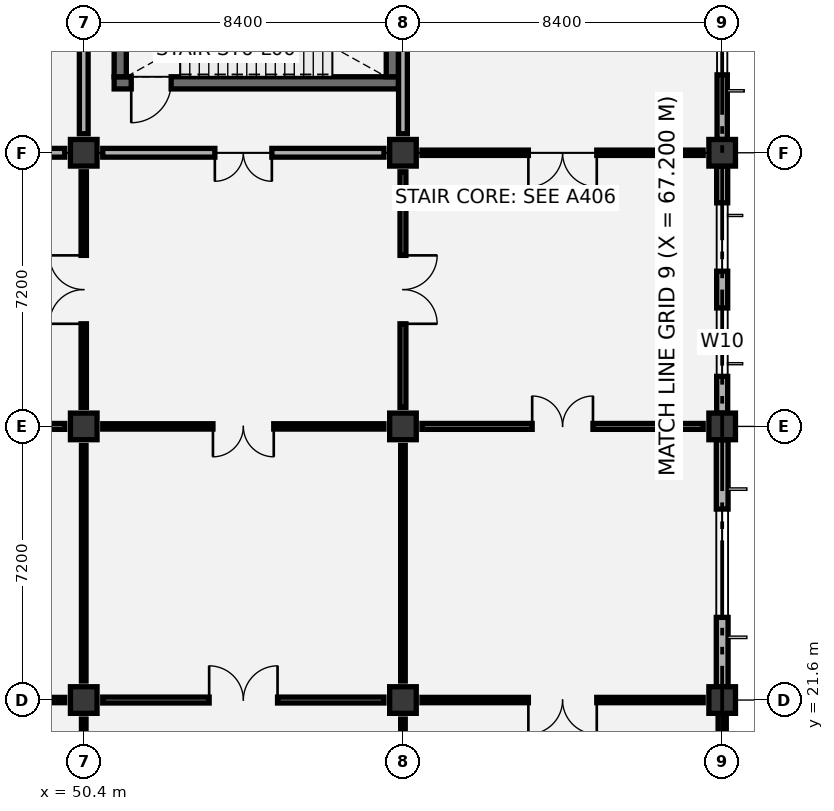
"""IFC4 building model, lengths in metres.
Left out: names, types, materials, properties, quantities, classifications, styles, units other than length and angle.
Written with IfcOpenShell. Run it as: python <this file> out.ifc"""

import sys

from ifc_helpers import new_model, si_unit, direction, frame, frame_2d, origin, origin_2d, place, context, subcontext, project, spatial, rectangle, extrude, element, fill, save


model = new_model("IFC4")
c1 = context("Model", 3, precision=1e-05, world=origin(), true_north=direction((0.0, 1.0)))
c2 = subcontext(c1, "Body", "Model", "MODEL_VIEW")
j1 = project(units=[si_unit("LENGTHUNIT", "METRE"), si_unit("PLANEANGLEUNIT", "RADIAN")], contexts=[c1])
p1 = place(None, origin())
s1 = spatial("IfcSite", under=j1, at=p1, CompositionType="ELEMENT")
p2 = place(p1, origin())
s2 = spatial("IfcBuilding", under=s1, at=p2, CompositionType="ELEMENT")
p3 = place(p2, origin())
s3 = spatial("IfcBuildingStorey", under=s2, at=p3, CompositionType="ELEMENT", Elevation=0.0)
for number, where, z_axis, x_axis in (
    (1, (50.4, 21.6, 0.0), (0.0, 0.0, 1.0), (1.0, 0.0, 0.0)),
    (2, (50.4, 28.8, 0.0), (0.0, 0.0, 1.0), (1.0, 0.0, 0.0)),
    (3, (50.4, 36.0, 0.0), (0.0, 0.0, 1.0), (1.0, 0.0, 0.0)),
    (4, (58.8, 21.6, 0.0), (0.0, 0.0, 1.0), (1.0, 0.0, 0.0)),
    (5, (58.8, 28.8, 0.0), (0.0, 0.0, 1.0), (1.0, 0.0, 0.0)),
    (6, (58.8, 36.0, 0.0), (0.0, 0.0, 1.0), (1.0, 0.0, 0.0)),
    (7, (67.2, 21.6, 0.0), (0.0, 0.0, 1.0), (1.0, 0.0, 0.0)),
    (8, (67.2, 28.8, 0.0), (0.0, 0.0, 1.0), (1.0, 0.0, 0.0)),
    (9, (67.2, 36.0, 0.0), (0.0, 0.0, 1.0), (1.0, 0.0, 0.0)),
):
    element("IfcColumn", number, at=place(p3, frame(where, z_axis=z_axis, x_axis=x_axis)), inside=s3, PredefinedType="COLUMN", context=c2, shape_type="SweptSolid", body=[
        extrude(rectangle(XDim=0.7, YDim=0.7, at=origin_2d()), origin(), (0.0, 0.0, 1.0), 6.0),
    ])
p4 = place(p3, frame((51.2, 37.84, 0.0), z_axis=(0.0, 0.0, 1.0), x_axis=(1.0, 0.0, 0.0)))
e10 = element("IfcWall", 10, at=p4, inside=s3, PredefinedType="SHEAR", context=c2, shape_type="SweptSolid", body=[
    extrude(rectangle(XDim=7.48, YDim=0.32, at=frame_2d((3.74, 0.0))), origin(), (0.0, 0.0, 1.0), 5.675),
])
p5 = place(p4, frame((0.45, 0.0, 0.0)))
e11 = element("IfcOpeningElement", 11, at=p5, cuts=e10, PredefinedType="OPENING", context=c2, shape_type="SweptSolid", body=[
    extrude(rectangle(XDim=1.05, YDim=2.15, at=frame_2d((0.525, 1.075))), frame((0.0, 0.17, 0.0), z_axis=(0.0, -1.0, 0.0), x_axis=(1.0, 0.0, 0.0)), (0.0, 0.0, 1.0), 0.34),
])
for number, where, z_axis, x_axis in (
    (12, (51.36, 38.0, 0.0), (0.0, 0.0, 1.0), (0.0, 1.0, 0.0)),
    (13, (58.52, 38.0, 0.0), (0.0, 0.0, 1.0), (0.0, 1.0, 0.0)),
):
    element("IfcWall", number, at=place(p3, frame(where, z_axis=z_axis, x_axis=x_axis)), inside=s3, PredefinedType="SHEAR", context=c2, shape_type="SweptSolid", body=[
        extrude(rectangle(XDim=3.8, YDim=0.32, at=frame_2d((1.9, 0.0))), origin(), (0.0, 0.0, 1.0), 5.675),
    ])
p6 = place(p3, frame((67.2, 14.75, 0.0), z_axis=(0.0, 0.0, 1.0), x_axis=(0.0, 1.0, 0.0)))
e14 = element("IfcWall", 14, at=p6, inside=s3, PredefinedType="SOLIDWALL", context=c2, shape_type="SweptSolid", body=[
    extrude(rectangle(XDim=6.5, YDim=0.215, at=frame_2d((3.25, 0.0))), origin(), (0.0, 0.0, 1.0), 5.02),
])
p7 = place(p6, frame((1.9, 0.0, 0.9)))
e15 = element("IfcOpeningElement", 15, at=p7, cuts=e14, PredefinedType="OPENING", context=c2, shape_type="SweptSolid", body=[
    extrude(rectangle(XDim=2.7, YDim=2.1, at=frame_2d((1.35, 1.05))), frame((0.0, 0.117, 0.0), z_axis=(0.0, -1.0, 0.0), x_axis=(1.0, 0.0, 0.0)), (0.0, 0.0, 1.0), 0.235),
])
p8 = place(p3, frame((67.2, 21.95, 0.0), z_axis=(0.0, 0.0, 1.0), x_axis=(0.0, 1.0, 0.0)))
e16 = element("IfcWall", 16, at=p8, inside=s3, PredefinedType="SOLIDWALL", context=c2, shape_type="SweptSolid", body=[
    extrude(rectangle(XDim=6.5, YDim=0.31, at=frame_2d((3.25, 0.0))), origin(), (0.0, 0.0, 1.0), 5.02),
])
p9 = place(p8, frame((1.825, 0.0, 0.9)))
e17 = element("IfcOpeningElement", 17, at=p9, cuts=e16, PredefinedType="OPENING", context=c2, shape_type="SweptSolid", body=[
    extrude(rectangle(XDim=2.85, YDim=1.95, at=frame_2d((1.425, 0.975))), frame((0.0, 0.165, 0.0), z_axis=(0.0, -1.0, 0.0), x_axis=(1.0, 0.0, 0.0)), (0.0, 0.0, 1.0), 0.33),
])
p10 = place(p3, frame((67.2, 29.15, 0.0), z_axis=(0.0, 0.0, 1.0), x_axis=(0.0, 1.0, 0.0)))
e18 = element("IfcWall", 18, at=p10, inside=s3, PredefinedType="SOLIDWALL", context=c2, shape_type="SweptSolid", body=[
    extrude(rectangle(XDim=6.5, YDim=0.29, at=frame_2d((3.25, 0.0))), origin(), (0.0, 0.0, 1.0), 5.02),
])
p11 = place(p10, frame((0.967, 0.0, 0.9)))
e19 = element("IfcOpeningElement", 19, at=p11, cuts=e18, PredefinedType="OPENING", context=c2, shape_type="SweptSolid", body=[
    extrude(rectangle(XDim=1.8, YDim=2.1, at=frame_2d((0.9, 1.05))), frame((0.0, 0.155, 0.0), z_axis=(0.0, -1.0, 0.0), x_axis=(1.0, 0.0, 0.0)), (0.0, 0.0, 1.0), 0.31),
])
p12 = place(p10, frame((3.733, 0.0, 0.9)))
e20 = element("IfcOpeningElement", 20, at=p12, cuts=e18, PredefinedType="OPENING", context=c2, shape_type="SweptSolid", body=[
    extrude(rectangle(XDim=1.8, YDim=2.1, at=frame_2d((0.9, 1.05))), frame((0.0, 0.155, 0.0), z_axis=(0.0, -1.0, 0.0), x_axis=(1.0, 0.0, 0.0)), (0.0, 0.0, 1.0), 0.31),
])
p13 = place(p3, frame((67.2, 36.35, 0.0), z_axis=(0.0, 0.0, 1.0), x_axis=(0.0, 1.0, 0.0)))
e21 = element("IfcWall", 21, at=p13, inside=s3, PredefinedType="SOLIDWALL", context=c2, shape_type="SweptSolid", body=[
    extrude(rectangle(XDim=6.4, YDim=0.27, at=frame_2d((3.2, 0.0))), origin(), (0.0, 0.0, 1.0), 5.02),
])
p14 = place(p13, frame((1.7, 0.0, 0.9)))
e22 = element("IfcOpeningElement", 22, at=p14, cuts=e21, PredefinedType="OPENING", context=c2, shape_type="SweptSolid", body=[
    extrude(rectangle(XDim=3.0, YDim=2.1, at=frame_2d((1.5, 1.05))), frame((0.0, 0.145, 0.0), z_axis=(0.0, -1.0, 0.0), x_axis=(1.0, 0.0, 0.0)), (0.0, 0.0, 1.0), 0.29),
])
p15 = place(p3, frame((50.4, 14.9, 0.0), z_axis=(0.0, 0.0, 1.0), x_axis=(0.0, 1.0, 0.0)))
e23 = element("IfcWall", 23, at=p15, inside=s3, PredefinedType="PARTITIONING", context=c2, shape_type="SweptSolid", body=[
    extrude(rectangle(XDim=6.2, YDim=0.12, at=frame_2d((3.1, 0.0))), origin(), (0.0, 0.0, 1.0), 5.38),
])
p16 = place(p3, frame((42.5, 21.6, 0.0), z_axis=(0.0, 0.0, 1.0), x_axis=(1.0, 0.0, 0.0)))
e24 = element("IfcWall", 24, at=p16, inside=s3, PredefinedType="PARTITIONING", context=c2, shape_type="SweptSolid", body=[
    extrude(rectangle(XDim=7.4, YDim=0.14, at=frame_2d((3.7, 0.0))), origin(), (0.0, 0.0, 1.0), 4.87),
])
p17 = place(p16, frame((2.8, 0.0, 0.0)))
e25 = element("IfcOpeningElement", 25, at=p17, cuts=e24, PredefinedType="OPENING", context=c2, shape_type="SweptSolid", body=[
    extrude(rectangle(XDim=1.8, YDim=2.25, at=frame_2d((0.9, 1.125))), frame((0.0, 0.08, 0.0), z_axis=(0.0, -1.0, 0.0), x_axis=(1.0, 0.0, 0.0)), (0.0, 0.0, 1.0), 0.16),
])
p18 = place(p3, frame((50.4, 22.1, 0.0), z_axis=(0.0, 0.0, 1.0), x_axis=(0.0, 1.0, 0.0)))
e26 = element("IfcWall", 26, at=p18, inside=s3, PredefinedType="PARTITIONING", context=c2, shape_type="SweptSolid", body=[
    extrude(rectangle(XDim=6.2, YDim=0.12, at=frame_2d((3.1, 0.0))), origin(), (0.0, 0.0, 1.0), 4.92),
])
p19 = place(p3, frame((42.5, 28.8, 0.0), z_axis=(0.0, 0.0, 1.0), x_axis=(1.0, 0.0, 0.0)))
e27 = element("IfcWall", 27, at=p19, inside=s3, PredefinedType="PARTITIONING", context=c2, shape_type="SweptSolid", body=[
    extrude(rectangle(XDim=7.4, YDim=0.155, at=frame_2d((3.7, 0.0))), origin(), (0.0, 0.0, 1.0), 4.87),
])
p20 = place(p19, frame((2.9, 0.0, 0.0)))
e28 = element("IfcOpeningElement", 28, at=p20, cuts=e27, PredefinedType="OPENING", context=c2, shape_type="SweptSolid", body=[
    extrude(rectangle(XDim=1.6, YDim=2.2, at=frame_2d((0.8, 1.1))), frame((0.0, 0.087, 0.0), z_axis=(0.0, -1.0, 0.0), x_axis=(1.0, 0.0, 0.0)), (0.0, 0.0, 1.0), 0.175),
])
p21 = place(p3, frame((50.4, 29.3, 0.0), z_axis=(0.0, 0.0, 1.0), x_axis=(0.0, 1.0, 0.0)))
e29 = element("IfcWall", 29, at=p21, inside=s3, PredefinedType="PARTITIONING", context=c2, shape_type="SweptSolid", body=[
    extrude(rectangle(XDim=6.2, YDim=0.14, at=frame_2d((3.1, 0.0))), origin(), (0.0, 0.0, 1.0), 5.17),
])
p22 = place(p21, frame((2.2, 0.0, 0.0)))
e30 = element("IfcOpeningElement", 30, at=p22, cuts=e29, PredefinedType="OPENING", context=c2, shape_type="SweptSolid", body=[
    extrude(rectangle(XDim=1.8, YDim=2.25, at=frame_2d((0.9, 1.125))), frame((0.0, 0.08, 0.0), z_axis=(0.0, -1.0, 0.0), x_axis=(1.0, 0.0, 0.0)), (0.0, 0.0, 1.0), 0.16),
])
p23 = place(p3, frame((42.5, 36.0, 0.0), z_axis=(0.0, 0.0, 1.0), x_axis=(1.0, 0.0, 0.0)))
e31 = element("IfcWall", 31, at=p23, inside=s3, PredefinedType="PARTITIONING", context=c2, shape_type="SweptSolid", body=[
    extrude(rectangle(XDim=7.4, YDim=0.23, at=frame_2d((3.7, 0.0))), origin(), (0.0, 0.0, 1.0), 4.87),
])
p24 = place(p23, frame((2.95, 0.0, 0.0)))
e32 = element("IfcOpeningElement", 32, at=p24, cuts=e31, PredefinedType="OPENING", context=c2, shape_type="SweptSolid", body=[
    extrude(rectangle(XDim=1.5, YDim=2.15, at=frame_2d((0.75, 1.075))), frame((0.0, 0.125, 0.0), z_axis=(0.0, -1.0, 0.0), x_axis=(1.0, 0.0, 0.0)), (0.0, 0.0, 1.0), 0.25),
])
p25 = place(p3, frame((50.4, 36.5, 0.0), z_axis=(0.0, 0.0, 1.0), x_axis=(0.0, 1.0, 0.0)))
e33 = element("IfcWall", 33, at=p25, inside=s3, PredefinedType="PARTITIONING", context=c2, shape_type="SweptSolid", body=[
    extrude(rectangle(XDim=6.2, YDim=0.23, at=frame_2d((3.1, 0.0))), origin(), (0.0, 0.0, 1.0), 4.92),
])
p26 = place(p3, frame((58.8, 14.9, 0.0), z_axis=(0.0, 0.0, 1.0), x_axis=(0.0, 1.0, 0.0)))
e34 = element("IfcWall", 34, at=p26, inside=s3, PredefinedType="PARTITIONING", context=c2, shape_type="SweptSolid", body=[
    extrude(rectangle(XDim=6.2, YDim=0.12, at=frame_2d((3.1, 0.0))), origin(), (0.0, 0.0, 1.0), 4.92),
])
p27 = place(p3, frame((50.9, 21.6, 0.0), z_axis=(0.0, 0.0, 1.0), x_axis=(1.0, 0.0, 0.0)))
e35 = element("IfcWall", 35, at=p27, inside=s3, PredefinedType="PARTITIONING", context=c2, shape_type="SweptSolid", body=[
    extrude(rectangle(XDim=7.4, YDim=0.155, at=frame_2d((3.7, 0.0))), origin(), (0.0, 0.0, 1.0), 4.87),
])
p28 = place(p27, frame((2.8, 0.0, 0.0)))
e36 = element("IfcOpeningElement", 36, at=p28, cuts=e35, PredefinedType="OPENING", context=c2, shape_type="SweptSolid", body=[
    extrude(rectangle(XDim=1.8, YDim=2.25, at=frame_2d((0.9, 1.125))), frame((0.0, 0.087, 0.0), z_axis=(0.0, -1.0, 0.0), x_axis=(1.0, 0.0, 0.0)), (0.0, 0.0, 1.0), 0.175),
])
p29 = place(p3, frame((58.8, 22.1, 0.0), z_axis=(0.0, 0.0, 1.0), x_axis=(0.0, 1.0, 0.0)))
e37 = element("IfcWall", 37, at=p29, inside=s3, PredefinedType="PARTITIONING", context=c2, shape_type="SweptSolid", body=[
    extrude(rectangle(XDim=6.2, YDim=0.12, at=frame_2d((3.1, 0.0))), origin(), (0.0, 0.0, 1.0), 5.17),
])
p30 = place(p3, frame((50.9, 28.8, 0.0), z_axis=(0.0, 0.0, 1.0), x_axis=(1.0, 0.0, 0.0)))
e38 = element("IfcWall", 38, at=p30, inside=s3, PredefinedType="PARTITIONING", context=c2, shape_type="SweptSolid", body=[
    extrude(rectangle(XDim=7.4, YDim=0.14, at=frame_2d((3.7, 0.0))), origin(), (0.0, 0.0, 1.0), 4.87),
])
p31 = place(p30, frame((2.9, 0.0, 0.0)))
e39 = element("IfcOpeningElement", 39, at=p31, cuts=e38, PredefinedType="OPENING", context=c2, shape_type="SweptSolid", body=[
    extrude(rectangle(XDim=1.6, YDim=2.2, at=frame_2d((0.8, 1.1))), frame((0.0, 0.08, 0.0), z_axis=(0.0, -1.0, 0.0), x_axis=(1.0, 0.0, 0.0)), (0.0, 0.0, 1.0), 0.16),
])
p32 = place(p3, frame((58.8, 29.3, 0.0), z_axis=(0.0, 0.0, 1.0), x_axis=(0.0, 1.0, 0.0)))
e40 = element("IfcWall", 40, at=p32, inside=s3, PredefinedType="PARTITIONING", context=c2, shape_type="SweptSolid", body=[
    extrude(rectangle(XDim=6.2, YDim=0.155, at=frame_2d((3.1, 0.0))), origin(), (0.0, 0.0, 1.0), 4.92),
])
p33 = place(p32, frame((2.2, 0.0, 0.0)))
e41 = element("IfcOpeningElement", 41, at=p33, cuts=e40, PredefinedType="OPENING", context=c2, shape_type="SweptSolid", body=[
    extrude(rectangle(XDim=1.8, YDim=2.25, at=frame_2d((0.9, 1.125))), frame((0.0, 0.087, 0.0), z_axis=(0.0, -1.0, 0.0), x_axis=(1.0, 0.0, 0.0)), (0.0, 0.0, 1.0), 0.175),
])
p34 = place(p3, frame((50.9, 36.0, 0.0), z_axis=(0.0, 0.0, 1.0), x_axis=(1.0, 0.0, 0.0)))
e42 = element("IfcWall", 42, at=p34, inside=s3, PredefinedType="PARTITIONING", context=c2, shape_type="SweptSolid", body=[
    extrude(rectangle(XDim=7.4, YDim=0.23, at=frame_2d((3.7, 0.0))), origin(), (0.0, 0.0, 1.0), 4.87),
])
p35 = place(p34, frame((2.95, 0.0, 0.0)))
e43 = element("IfcOpeningElement", 43, at=p35, cuts=e42, PredefinedType="OPENING", context=c2, shape_type="SweptSolid", body=[
    extrude(rectangle(XDim=1.5, YDim=2.15, at=frame_2d((0.75, 1.075))), frame((0.0, 0.125, 0.0), z_axis=(0.0, -1.0, 0.0), x_axis=(1.0, 0.0, 0.0)), (0.0, 0.0, 1.0), 0.25),
])
p36 = place(p3, frame((58.8, 36.5, 0.0), z_axis=(0.0, 0.0, 1.0), x_axis=(0.0, 1.0, 0.0)))
e44 = element("IfcWall", 44, at=p36, inside=s3, PredefinedType="PARTITIONING", context=c2, shape_type="SweptSolid", body=[
    extrude(rectangle(XDim=6.2, YDim=0.23, at=frame_2d((3.1, 0.0))), origin(), (0.0, 0.0, 1.0), 5.27),
])
p37 = place(p3, frame((59.3, 21.6, 0.0), z_axis=(0.0, 0.0, 1.0), x_axis=(1.0, 0.0, 0.0)))
e45 = element("IfcWall", 45, at=p37, inside=s3, PredefinedType="PARTITIONING", context=c2, shape_type="SweptSolid", body=[
    extrude(rectangle(XDim=7.4, YDim=0.14, at=frame_2d((3.7, 0.0))), origin(), (0.0, 0.0, 1.0), 4.87),
])
p38 = place(p37, frame((2.8, 0.0, 0.0)))
e46 = element("IfcOpeningElement", 46, at=p38, cuts=e45, PredefinedType="OPENING", context=c2, shape_type="SweptSolid", body=[
    extrude(rectangle(XDim=1.8, YDim=2.25, at=frame_2d((0.9, 1.125))), frame((0.0, 0.08, 0.0), z_axis=(0.0, -1.0, 0.0), x_axis=(1.0, 0.0, 0.0)), (0.0, 0.0, 1.0), 0.16),
])
p39 = place(p3, frame((59.3, 28.8, 0.0), z_axis=(0.0, 0.0, 1.0), x_axis=(1.0, 0.0, 0.0)))
e47 = element("IfcWall", 47, at=p39, inside=s3, PredefinedType="PARTITIONING", context=c2, shape_type="SweptSolid", body=[
    extrude(rectangle(XDim=7.4, YDim=0.155, at=frame_2d((3.7, 0.0))), origin(), (0.0, 0.0, 1.0), 4.87),
])
p40 = place(p39, frame((2.9, 0.0, 0.0)))
e48 = element("IfcOpeningElement", 48, at=p40, cuts=e47, PredefinedType="OPENING", context=c2, shape_type="SweptSolid", body=[
    extrude(rectangle(XDim=1.6, YDim=2.2, at=frame_2d((0.8, 1.1))), frame((0.0, 0.087, 0.0), z_axis=(0.0, -1.0, 0.0), x_axis=(1.0, 0.0, 0.0)), (0.0, 0.0, 1.0), 0.175),
])
p41 = place(p3, frame((59.3, 36.0, 0.0), z_axis=(0.0, 0.0, 1.0), x_axis=(1.0, 0.0, 0.0)))
e49 = element("IfcWall", 49, at=p41, inside=s3, PredefinedType="PARTITIONING", context=c2, shape_type="SweptSolid", body=[
    extrude(rectangle(XDim=7.4, YDim=0.14, at=frame_2d((3.7, 0.0))), origin(), (0.0, 0.0, 1.0), 4.87),
])
p42 = place(p41, frame((2.8, 0.0, 0.0)))
e50 = element("IfcOpeningElement", 50, at=p42, cuts=e49, PredefinedType="OPENING", context=c2, shape_type="SweptSolid", body=[
    extrude(rectangle(XDim=1.8, YDim=2.25, at=frame_2d((0.9, 1.125))), frame((0.0, 0.08, 0.0), z_axis=(0.0, -1.0, 0.0), x_axis=(1.0, 0.0, 0.0)), (0.0, 0.0, 1.0), 0.16),
])
p43 = place(p9, origin())
e51 = element("IfcWindow", 51, at=p43, inside=s3, PartitioningType="SINGLE_PANEL", PredefinedType="WINDOW", context=c2, shape_type="SweptSolid", body=[
    extrude(rectangle(XDim=2.85, YDim=1.95, at=frame_2d((1.425, 0.975))), frame((0.0, 0.03, 0.0), z_axis=(0.0, -1.0, 0.0), x_axis=(1.0, 0.0, 0.0)), (0.0, 0.0, 1.0), 0.06),
])
fill(e17, e51)
p44 = place(p11, origin())
e52 = element("IfcWindow", 52, at=p44, inside=s3, PartitioningType="SINGLE_PANEL", PredefinedType="WINDOW", context=c2, shape_type="SweptSolid", body=[
    extrude(rectangle(XDim=1.8, YDim=2.1, at=frame_2d((0.9, 1.05))), frame((0.0, 0.03, 0.0), z_axis=(0.0, -1.0, 0.0), x_axis=(1.0, 0.0, 0.0)), (0.0, 0.0, 1.0), 0.06),
])
fill(e19, e52)
p45 = place(p12, origin())
e53 = element("IfcWindow", 53, at=p45, inside=s3, PartitioningType="SINGLE_PANEL", PredefinedType="WINDOW", context=c2, shape_type="SweptSolid", body=[
    extrude(rectangle(XDim=1.8, YDim=2.1, at=frame_2d((0.9, 1.05))), frame((0.0, 0.03, 0.0), z_axis=(0.0, -1.0, 0.0), x_axis=(1.0, 0.0, 0.0)), (0.0, 0.0, 1.0), 0.06),
])
fill(e20, e53)
p46 = place(p14, origin())
e54 = element("IfcWindow", 54, at=p46, inside=s3, PartitioningType="SINGLE_PANEL", PredefinedType="WINDOW", context=c2, shape_type="SweptSolid", body=[
    extrude(rectangle(XDim=3.0, YDim=2.1, at=frame_2d((1.5, 1.05))), frame((0.0, 0.03, 0.0), z_axis=(0.0, -1.0, 0.0), x_axis=(1.0, 0.0, 0.0)), (0.0, 0.0, 1.0), 0.06),
])
fill(e22, e54)
p47 = place(p5, frame((1.05, 0.0, 0.0), z_axis=(0.0, 0.0, 1.0), x_axis=(-1.0, 0.0, 0.0)))
e55 = element("IfcDoor", 55, at=p47, inside=s3, OperationType="SINGLE_SWING_RIGHT", PredefinedType="DOOR", context=c2, shape_type="SweptSolid", body=[
    extrude(rectangle(XDim=1.05, YDim=2.15, at=frame_2d((0.525, 1.075))), frame((0.0, 0.025, 0.0), z_axis=(0.0, -1.0, 0.0), x_axis=(1.0, 0.0, 0.0)), (0.0, 0.0, 1.0), 0.05),
])
fill(e11, e55)
p48 = place(p22, origin())
e56 = element("IfcDoor", 56, at=p48, inside=s3, OperationType="DOUBLE_DOOR_SINGLE_SWING", PredefinedType="DOOR", context=c2, shape_type="SweptSolid", body=[
    extrude(rectangle(XDim=1.8, YDim=2.25, at=frame_2d((0.9, 1.125))), frame((0.0, 0.025, 0.0), z_axis=(0.0, -1.0, 0.0), x_axis=(1.0, 0.0, 0.0)), (0.0, 0.0, 1.0), 0.05),
])
fill(e30, e56)
p49 = place(p28, origin())
e57 = element("IfcDoor", 57, at=p49, inside=s3, OperationType="DOUBLE_DOOR_SINGLE_SWING", PredefinedType="DOOR", context=c2, shape_type="SweptSolid", body=[
    extrude(rectangle(XDim=1.8, YDim=2.25, at=frame_2d((0.9, 1.125))), frame((0.0, 0.025, 0.0), z_axis=(0.0, -1.0, 0.0), x_axis=(1.0, 0.0, 0.0)), (0.0, 0.0, 1.0), 0.05),
])
fill(e36, e57)
p50 = place(p31, frame((1.6, 0.0, 0.0), z_axis=(0.0, 0.0, 1.0), x_axis=(-1.0, 0.0, 0.0)))
e58 = element("IfcDoor", 58, at=p50, inside=s3, OperationType="DOUBLE_DOOR_SINGLE_SWING", PredefinedType="DOOR", context=c2, shape_type="SweptSolid", body=[
    extrude(rectangle(XDim=1.6, YDim=2.2, at=frame_2d((0.8, 1.1))), frame((0.0, 0.025, 0.0), z_axis=(0.0, -1.0, 0.0), x_axis=(1.0, 0.0, 0.0)), (0.0, 0.0, 1.0), 0.05),
])
fill(e39, e58)
p51 = place(p33, frame((1.8, 0.0, 0.0), z_axis=(0.0, 0.0, 1.0), x_axis=(-1.0, 0.0, 0.0)))
e59 = element("IfcDoor", 59, at=p51, inside=s3, OperationType="DOUBLE_DOOR_SINGLE_SWING", PredefinedType="DOOR", context=c2, shape_type="SweptSolid", body=[
    extrude(rectangle(XDim=1.8, YDim=2.25, at=frame_2d((0.9, 1.125))), frame((0.0, 0.025, 0.0), z_axis=(0.0, -1.0, 0.0), x_axis=(1.0, 0.0, 0.0)), (0.0, 0.0, 1.0), 0.05),
])
fill(e41, e59)
p52 = place(p35, frame((1.5, 0.0, 0.0), z_axis=(0.0, 0.0, 1.0), x_axis=(-1.0, 0.0, 0.0)))
e60 = element("IfcDoor", 60, at=p52, inside=s3, OperationType="DOUBLE_DOOR_SINGLE_SWING", PredefinedType="DOOR", context=c2, shape_type="SweptSolid", body=[
    extrude(rectangle(XDim=1.5, YDim=2.15, at=frame_2d((0.75, 1.075))), frame((0.0, 0.025, 0.0), z_axis=(0.0, -1.0, 0.0), x_axis=(1.0, 0.0, 0.0)), (0.0, 0.0, 1.0), 0.05),
])
fill(e43, e60)
p53 = place(p38, frame((1.8, 0.0, 0.0), z_axis=(0.0, 0.0, 1.0), x_axis=(-1.0, 0.0, 0.0)))
e61 = element("IfcDoor", 61, at=p53, inside=s3, OperationType="DOUBLE_DOOR_SINGLE_SWING", PredefinedType="DOOR", context=c2, shape_type="SweptSolid", body=[
    extrude(rectangle(XDim=1.8, YDim=2.25, at=frame_2d((0.9, 1.125))), frame((0.0, 0.025, 0.0), z_axis=(0.0, -1.0, 0.0), x_axis=(1.0, 0.0, 0.0)), (0.0, 0.0, 1.0), 0.05),
])
fill(e46, e61)
p54 = place(p40, origin())
e62 = element("IfcDoor", 62, at=p54, inside=s3, OperationType="DOUBLE_DOOR_SINGLE_SWING", PredefinedType="DOOR", context=c2, shape_type="SweptSolid", body=[
    extrude(rectangle(XDim=1.6, YDim=2.2, at=frame_2d((0.8, 1.1))), frame((0.0, 0.025, 0.0), z_axis=(0.0, -1.0, 0.0), x_axis=(1.0, 0.0, 0.0)), (0.0, 0.0, 1.0), 0.05),
])
fill(e48, e62)
p55 = place(p42, frame((1.8, 0.0, 0.0), z_axis=(0.0, 0.0, 1.0), x_axis=(-1.0, 0.0, 0.0)))
e63 = element("IfcDoor", 63, at=p55, inside=s3, OperationType="DOUBLE_DOOR_SINGLE_SWING", PredefinedType="DOOR", context=c2, shape_type="SweptSolid", body=[
    extrude(rectangle(XDim=1.8, YDim=2.25, at=frame_2d((0.9, 1.125))), frame((0.0, 0.025, 0.0), z_axis=(0.0, -1.0, 0.0), x_axis=(1.0, 0.0, 0.0)), (0.0, 0.0, 1.0), 0.05),
])
fill(e50, e63)
save(model, sys.argv[1])
